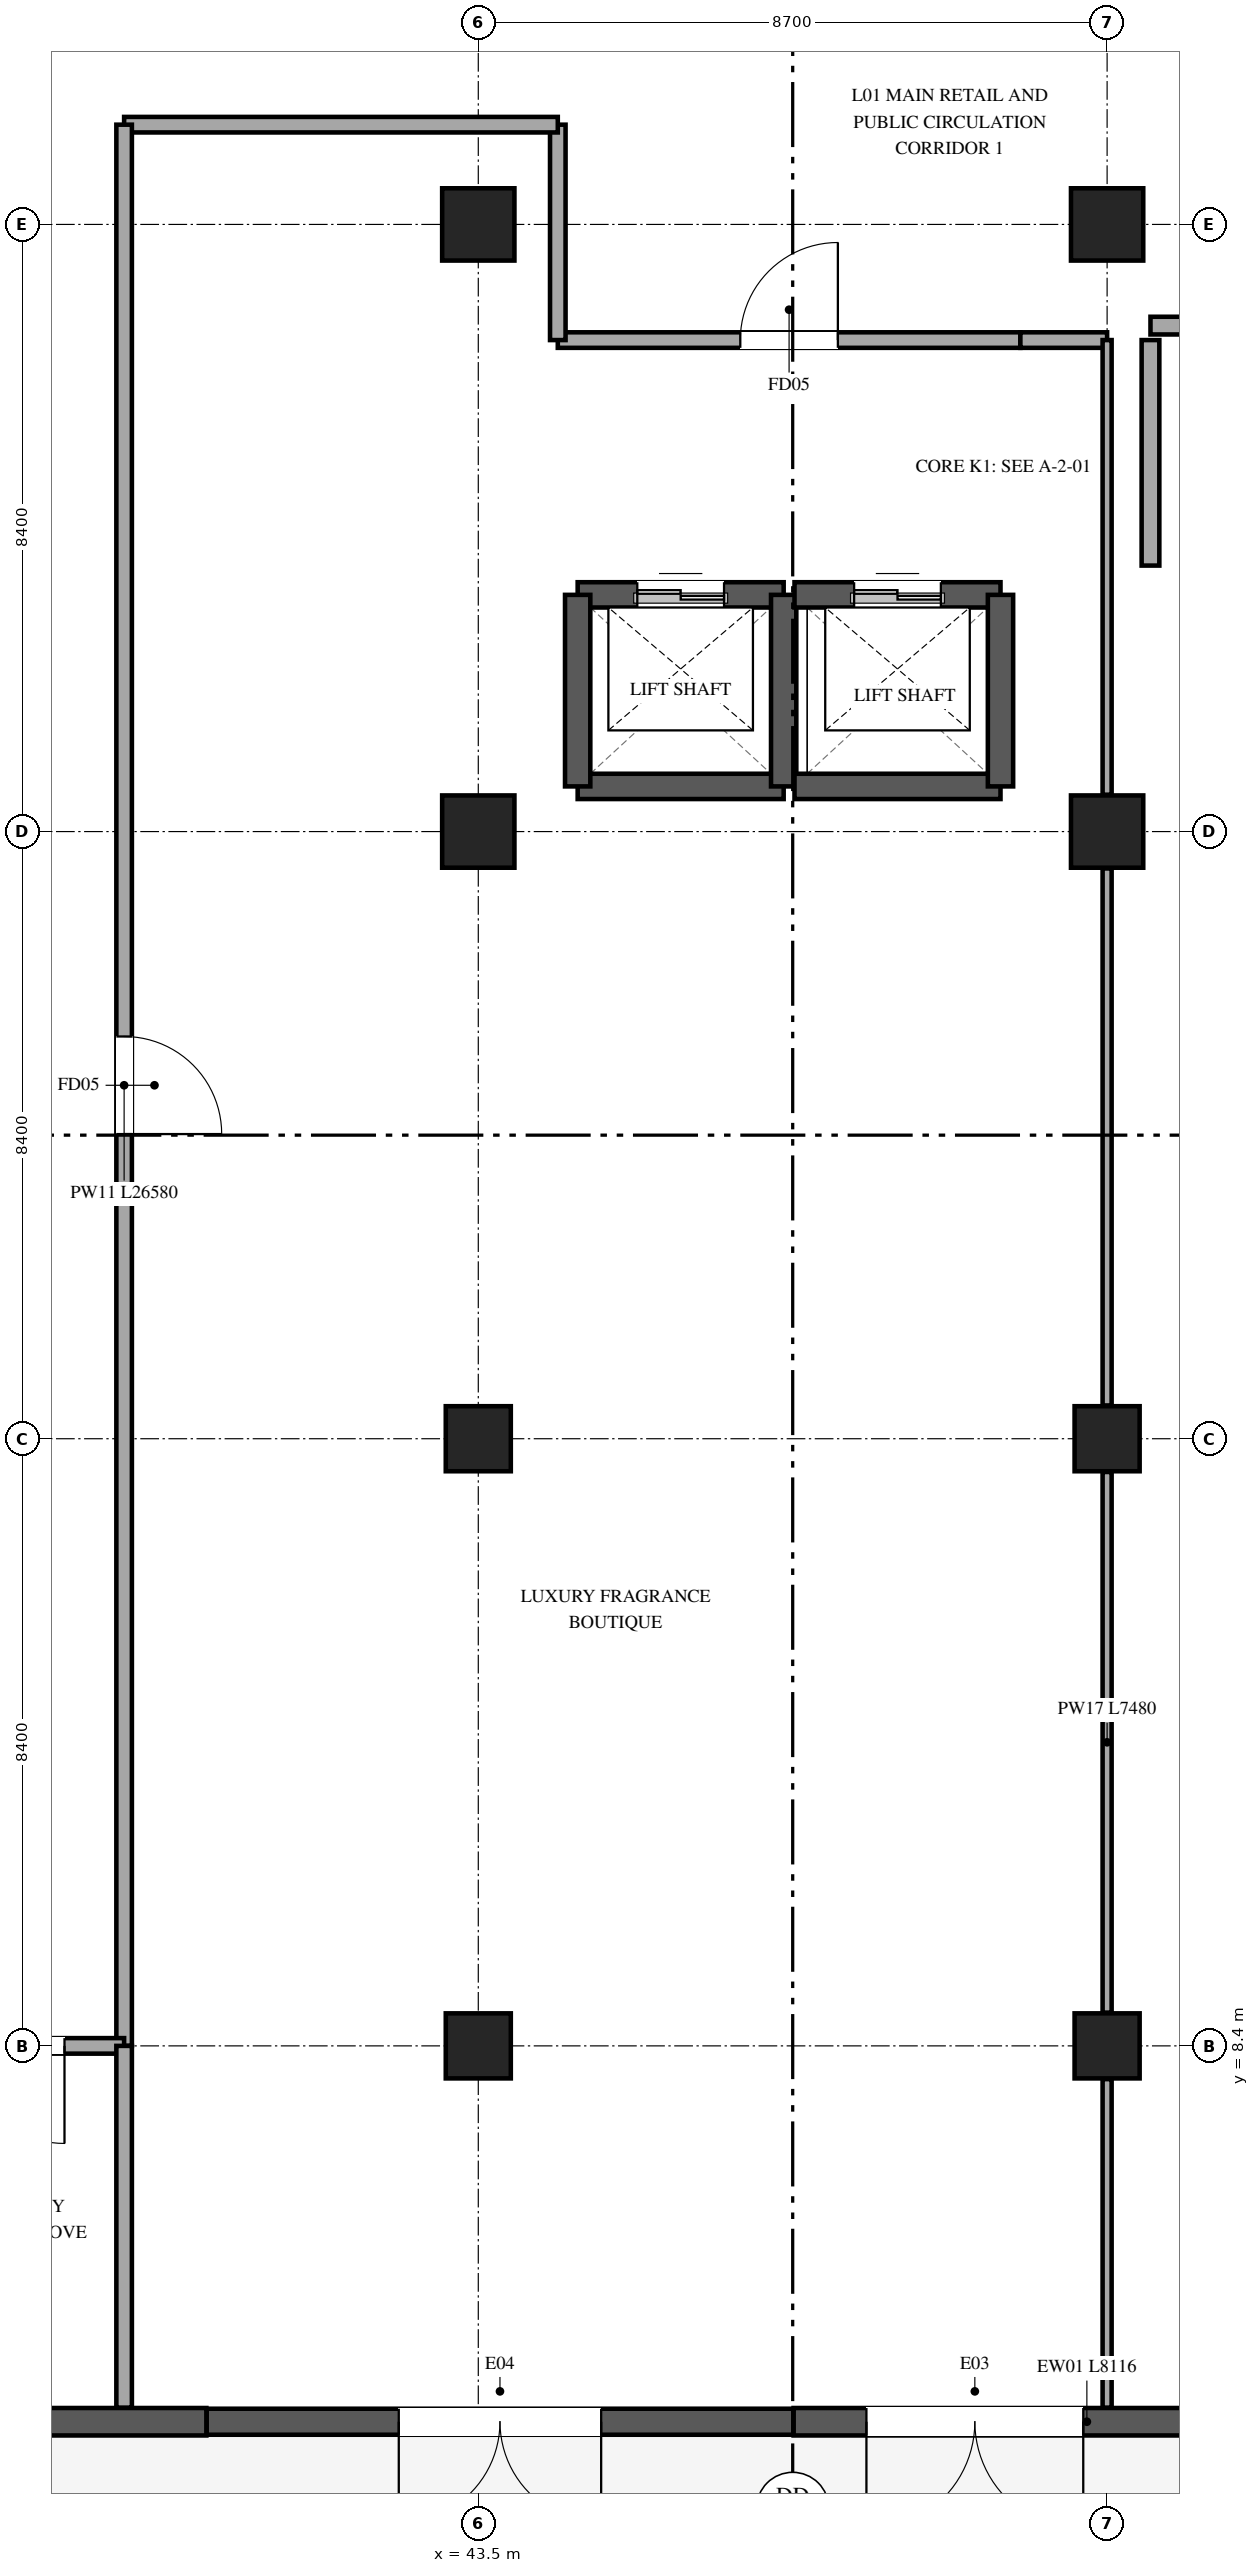
"""IFC4 building model, lengths in metres.
Left out: names, types, materials, properties, quantities, classifications, styles, units other than length and angle.
Written with IfcOpenShell. Run it as: python <this file> out.ifc"""

import sys

from ifc_helpers import new_model, si_unit, direction, frame, frame_2d, origin, origin_2d, place, context, subcontext, project, spatial, rectangle, extrude, element, fill, save


model = new_model("IFC4")
c1 = context("Model", 3, precision=1e-05, world=origin(), true_north=direction((0.0, 1.0)))
c2 = subcontext(c1, "Body", "Model", "MODEL_VIEW")
j1 = project(units=[si_unit("LENGTHUNIT", "METRE"), si_unit("PLANEANGLEUNIT", "RADIAN")], contexts=[c1])
p1 = place(None, origin())
s1 = spatial("IfcSite", under=j1, at=p1, CompositionType="ELEMENT")
p2 = place(p1, origin())
s2 = spatial("IfcBuilding", under=s1, at=p2, CompositionType="ELEMENT")
p3 = place(p2, origin())
s3 = spatial("IfcBuildingStorey", under=s2, at=p3, CompositionType="ELEMENT", Elevation=0.0)
for number, where, z_axis, x_axis in (
    (1, (43.5, 8.4, 0.0), (0.0, 0.0, 1.0), (1.0, 0.0, 0.0)),
    (2, (43.5, 16.8, 0.0), (0.0, 0.0, 1.0), (1.0, 0.0, 0.0)),
):
    element("IfcColumn", number, at=place(p3, frame(where, z_axis=z_axis, x_axis=x_axis)), inside=s3, PredefinedType="COLUMN", context=c2, shape_type="SweptSolid", body=[
        extrude(rectangle(XDim=0.9, YDim=0.9, at=origin_2d()), origin(), (0.0, 0.0, 1.0), 6.0),
    ])
for number, where, z_axis, x_axis in (
    (3, (43.5, 25.2, 0.0), (0.0, 0.0, 1.0), (1.0, 0.0, 0.0)),
    (4, (43.5, 33.6, 0.0), (0.0, 0.0, 1.0), (1.0, 0.0, 0.0)),
):
    element("IfcColumn", number, at=place(p3, frame(where, z_axis=z_axis, x_axis=x_axis)), inside=s3, PredefinedType="COLUMN", context=c2, shape_type="SweptSolid", body=[
        extrude(rectangle(XDim=1.0, YDim=1.0, at=origin_2d()), origin(), (0.0, 0.0, 1.0), 6.0),
    ])
for number, where, z_axis, x_axis in (
    (5, (52.2, 8.4, 0.0), (0.0, 0.0, 1.0), (1.0, 0.0, 0.0)),
    (6, (52.2, 16.8, 0.0), (0.0, 0.0, 1.0), (1.0, 0.0, 0.0)),
):
    element("IfcColumn", number, at=place(p3, frame(where, z_axis=z_axis, x_axis=x_axis)), inside=s3, PredefinedType="COLUMN", context=c2, shape_type="SweptSolid", body=[
        extrude(rectangle(XDim=0.9, YDim=0.9, at=origin_2d()), origin(), (0.0, 0.0, 1.0), 6.0),
    ])
for number, where, z_axis, x_axis in (
    (7, (52.2, 25.2, 0.0), (0.0, 0.0, 1.0), (1.0, 0.0, 0.0)),
    (8, (52.2, 33.6, 0.0), (0.0, 0.0, 1.0), (1.0, 0.0, 0.0)),
):
    element("IfcColumn", number, at=place(p3, frame(where, z_axis=z_axis, x_axis=x_axis)), inside=s3, PredefinedType="COLUMN", context=c2, shape_type="SweptSolid", body=[
        extrude(rectangle(XDim=1.0, YDim=1.0, at=origin_2d()), origin(), (0.0, 0.0, 1.0), 6.0),
    ])
p4 = place(p3, frame((55.978, 3.2, 0.0), z_axis=(0.0, 0.0, 1.0), x_axis=(-1.0, 0.0, 0.0)))
e9 = element("IfcWall", 9, at=p4, inside=s3, PredefinedType="STANDARD", context=c2, shape_type="SweptSolid", body=[
    extrude(rectangle(XDim=8.116, YDim=0.38, at=frame_2d((4.058, 0.0))), origin(), (0.0, 0.0, 1.0), 5.66),
])
p5 = place(p4, frame((4.108, 0.0, 0.0)))
e10 = element("IfcOpeningElement", 10, at=p5, cuts=e9, PredefinedType="OPENING", context=c2, shape_type="SweptSolid", body=[
    extrude(rectangle(XDim=3.0, YDim=2.6, at=frame_2d((1.5, 1.3))), frame((0.0, 0.2, 0.0), z_axis=(0.0, -1.0, 0.0), x_axis=(1.0, 0.0, 0.0)), (0.0, 0.0, 1.0), 0.4),
])
p6 = place(p3, frame((47.858, 3.2, 0.0), z_axis=(0.0, 0.0, 1.0), x_axis=(-1.0, 0.0, 0.0)))
e11 = element("IfcWall", 11, at=p6, inside=s3, PredefinedType="STANDARD", context=c2, shape_type="SweptSolid", body=[
    extrude(rectangle(XDim=8.116, YDim=0.36, at=frame_2d((4.058, 0.0))), origin(), (0.0, 0.0, 1.0), 5.66),
])
p7 = place(p6, frame((2.658, 0.0, 0.0)))
e12 = element("IfcOpeningElement", 12, at=p7, cuts=e11, PredefinedType="OPENING", context=c2, shape_type="SweptSolid", body=[
    extrude(rectangle(XDim=2.8, YDim=2.5, at=frame_2d((1.4, 1.25))), frame((0.0, 0.19, 0.0), z_axis=(0.0, -1.0, 0.0), x_axis=(1.0, 0.0, 0.0)), (0.0, 0.0, 1.0), 0.38),
])
p8 = place(p3, frame((39.738, 3.2, 0.0), z_axis=(0.0, 0.0, 1.0), x_axis=(-1.0, 0.0, 0.0)))
e13 = element("IfcWall", 13, at=p8, inside=s3, PredefinedType="STANDARD", context=c2, shape_type="SweptSolid", body=[
    extrude(rectangle(XDim=8.116, YDim=0.38, at=frame_2d((4.058, 0.0))), origin(), (0.0, 0.0, 1.0), 5.66),
])
p9 = place(p3, frame((44.875, 28.475, 0.0), z_axis=(0.0, 0.0, 1.0), x_axis=(1.0, 0.0, 0.0)))
e14 = element("IfcWall", 14, at=p9, inside=s3, PredefinedType="SHEAR", context=c2, shape_type="SweptSolid", body=[
    extrude(rectangle(XDim=2.85, YDim=0.35, at=frame_2d((1.425, 0.0))), origin(), (0.0, 0.0, 1.0), 6.0),
])
p10 = place(p9, frame((0.825, 0.0, 0.0)))
e15 = element("IfcOpeningElement", 15, at=p10, cuts=e14, PredefinedType="OPENING", context=c2, shape_type="SweptSolid", body=[
    extrude(rectangle(XDim=1.2, YDim=2.2, at=frame_2d((0.6, 1.1))), frame((0.0, 0.185, 0.0), z_axis=(0.0, -1.0, 0.0), x_axis=(1.0, 0.0, 0.0)), (0.0, 0.0, 1.0), 0.37),
])
p11 = place(p3, frame((47.725, 25.825, 0.0), z_axis=(0.0, 0.0, 1.0), x_axis=(-1.0, 0.0, 0.0)))
e16 = element("IfcWall", 16, at=p11, inside=s3, PredefinedType="SHEAR", context=c2, shape_type="SweptSolid", body=[
    extrude(rectangle(XDim=2.85, YDim=0.35, at=frame_2d((1.425, 0.0))), origin(), (0.0, 0.0, 1.0), 6.0),
])
for number, where, z_axis, x_axis in (
    (17, (44.875, 25.825, 0.0), (0.0, 0.0, 1.0), (0.0, 1.0, 0.0)),
    (18, (47.725, 28.475, 0.0), (0.0, 0.0, 1.0), (0.0, -1.0, 0.0)),
):
    element("IfcWall", number, at=place(p3, frame(where, z_axis=z_axis, x_axis=x_axis)), inside=s3, PredefinedType="SHEAR", context=c2, shape_type="SweptSolid", body=[
        extrude(rectangle(XDim=2.65, YDim=0.35, at=frame_2d((1.325, 0.0))), origin(), (0.0, 0.0, 1.0), 6.0),
    ])
p12 = place(p3, frame((47.875, 28.475, 0.0), z_axis=(0.0, 0.0, 1.0), x_axis=(1.0, 0.0, 0.0)))
e19 = element("IfcWall", 19, at=p12, inside=s3, PredefinedType="SHEAR", context=c2, shape_type="SweptSolid", body=[
    extrude(rectangle(XDim=2.85, YDim=0.35, at=frame_2d((1.425, 0.0))), origin(), (0.0, 0.0, 1.0), 6.0),
])
p13 = place(p12, frame((0.825, 0.0, 0.0)))
e20 = element("IfcOpeningElement", 20, at=p13, cuts=e19, PredefinedType="OPENING", context=c2, shape_type="SweptSolid", body=[
    extrude(rectangle(XDim=1.2, YDim=2.2, at=frame_2d((0.6, 1.1))), frame((0.0, 0.185, 0.0), z_axis=(0.0, -1.0, 0.0), x_axis=(1.0, 0.0, 0.0)), (0.0, 0.0, 1.0), 0.37),
])
p14 = place(p3, frame((50.725, 25.825, 0.0), z_axis=(0.0, 0.0, 1.0), x_axis=(-1.0, 0.0, 0.0)))
e21 = element("IfcWall", 21, at=p14, inside=s3, PredefinedType="SHEAR", context=c2, shape_type="SweptSolid", body=[
    extrude(rectangle(XDim=2.85, YDim=0.35, at=frame_2d((1.425, 0.0))), origin(), (0.0, 0.0, 1.0), 6.0),
])
p15 = place(p3, frame((50.725, 28.475, 0.0), z_axis=(0.0, 0.0, 1.0), x_axis=(0.0, -1.0, 0.0)))
e22 = element("IfcWall", 22, at=p15, inside=s3, PredefinedType="SHEAR", context=c2, shape_type="SweptSolid", body=[
    extrude(rectangle(XDim=2.65, YDim=0.35, at=frame_2d((1.325, 0.0))), origin(), (0.0, 0.0, 1.0), 6.0),
])
p16 = place(p3, frame((52.8, 32.2, 0.0), z_axis=(0.0, 0.0, 1.0), x_axis=(1.0, 0.0, 0.0)))
e23 = element("IfcWall", 23, at=p16, inside=s3, PredefinedType="STANDARD", context=c2, shape_type="SweptSolid", body=[
    extrude(rectangle(XDim=4.0, YDim=0.245, at=frame_2d((2.0, 0.0))), origin(), (0.0, 0.0, 1.0), 5.66),
])
p17 = place(p16, frame((1.275, 0.0, 0.0)))
e24 = element("IfcOpeningElement", 24, at=p17, cuts=e23, PredefinedType="OPENING", context=c2, shape_type="SweptSolid", body=[
    extrude(rectangle(XDim=1.45, YDim=2.2, at=frame_2d((0.725, 1.1))), frame((0.0, 0.133, 0.0), z_axis=(0.0, -1.0, 0.0), x_axis=(1.0, 0.0, 0.0)), (0.0, 0.0, 1.0), 0.265),
])
p18 = place(p3, frame((52.8, 28.88, 0.0), z_axis=(0.0, 0.0, 1.0), x_axis=(0.0, 1.0, 0.0)))
e25 = element("IfcWall", 25, at=p18, inside=s3, PredefinedType="STANDARD", context=c2, shape_type="SweptSolid", body=[
    extrude(rectangle(XDim=3.12, YDim=0.245, at=frame_2d((1.56, 0.0))), origin(), (0.0, 0.0, 1.0), 5.66),
])
p19 = place(p3, frame((44.6, 32.0, 0.0), z_axis=(0.0, 0.0, 1.0), x_axis=(1.0, 0.0, 0.0)))
e26 = element("IfcWall", 26, at=p19, inside=s3, PredefinedType="PARTITIONING", context=c2, shape_type="SweptSolid", body=[
    extrude(rectangle(XDim=6.4, YDim=0.215, at=frame_2d((3.2, 0.0))), origin(), (0.0, 0.0, 1.0), 5.66),
])
p20 = place(p19, frame((2.525, 0.0, 0.0)))
e27 = element("IfcOpeningElement", 27, at=p20, cuts=e26, PredefinedType="OPENING", context=c2, shape_type="SweptSolid", body=[
    extrude(rectangle(XDim=1.35, YDim=2.2, at=frame_2d((0.675, 1.1))), frame((0.0, 0.118, 0.0), z_axis=(0.0, -1.0, 0.0), x_axis=(1.0, 0.0, 0.0)), (0.0, 0.0, 1.0), 0.235),
])
p21 = place(p3, frame((44.6, 32.0, 0.0), z_axis=(0.0, 0.0, 1.0), x_axis=(0.0, 1.0, 0.0)))
e28 = element("IfcWall", 28, at=p21, inside=s3, PredefinedType="PARTITIONING", context=c2, shape_type="SweptSolid", body=[
    extrude(rectangle(XDim=2.98, YDim=0.215, at=frame_2d((1.49, 0.0))), origin(), (0.0, 0.0, 1.0), 4.91),
])
p22 = place(p3, frame((44.6, 34.98, 0.0), z_axis=(0.0, 0.0, 1.0), x_axis=(-1.0, 0.0, 0.0)))
e29 = element("IfcWall", 29, at=p22, inside=s3, PredefinedType="PARTITIONING", context=c2, shape_type="SweptSolid", body=[
    extrude(rectangle(XDim=6.0, YDim=0.215, at=frame_2d((3.0, 0.0))), origin(), (0.0, 0.0, 1.0), 4.91),
])
p23 = place(p3, frame((38.6, 34.98, 0.0), z_axis=(0.0, 0.0, 1.0), x_axis=(0.0, -1.0, 0.0)))
e30 = element("IfcWall", 30, at=p23, inside=s3, PredefinedType="PARTITIONING", context=c2, shape_type="SweptSolid", body=[
    extrude(rectangle(XDim=26.58, YDim=0.215, at=frame_2d((13.29, 0.0))), origin(), (0.0, 0.0, 1.0), 4.91),
])
p24 = place(p23, frame((12.615, 0.0, 0.0)))
e31 = element("IfcOpeningElement", 31, at=p24, cuts=e30, PredefinedType="OPENING", context=c2, shape_type="SweptSolid", body=[
    extrude(rectangle(XDim=1.35, YDim=2.2, at=frame_2d((0.675, 1.1))), frame((0.0, 0.118, 0.0), z_axis=(0.0, -1.0, 0.0), x_axis=(1.0, 0.0, 0.0)), (0.0, 0.0, 1.0), 0.235),
])
p25 = place(p3, frame((52.2, 32.0, 0.0), z_axis=(0.0, 0.0, 1.0), x_axis=(-1.0, 0.0, 0.0)))
e32 = element("IfcWall", 32, at=p25, inside=s3, PredefinedType="PARTITIONING", context=c2, shape_type="SweptSolid", body=[
    extrude(rectangle(XDim=1.2, YDim=0.215, at=frame_2d((0.6, 0.0))), origin(), (0.0, 0.0, 1.0), 4.91),
])
p26 = place(p3, frame((38.6, 8.4, 0.0), z_axis=(0.0, 0.0, 1.0), x_axis=(-1.0, 0.0, 0.0)))
e33 = element("IfcWall", 33, at=p26, inside=s3, PredefinedType="PARTITIONING", context=c2, shape_type="SweptSolid", body=[
    extrude(rectangle(XDim=3.0, YDim=0.215, at=frame_2d((1.5, 0.0))), origin(), (0.0, 0.0, 1.0), 4.91),
])
p27 = place(p26, frame((0.825, 0.0, 0.0)))
e34 = element("IfcOpeningElement", 34, at=p27, cuts=e33, PredefinedType="OPENING", context=c2, shape_type="SweptSolid", body=[
    extrude(rectangle(XDim=1.35, YDim=2.2, at=frame_2d((0.675, 1.1))), frame((0.0, 0.118, 0.0), z_axis=(0.0, -1.0, 0.0), x_axis=(1.0, 0.0, 0.0)), (0.0, 0.0, 1.0), 0.235),
])
p28 = place(p3, frame((52.2, 32.0, 0.0), z_axis=(0.0, 0.0, 1.0), x_axis=(0.0, -1.0, 0.0)))
e35 = element("IfcWall", 35, at=p28, inside=s3, PredefinedType="PARTITIONING", context=c2, shape_type="SweptSolid", body=[
    extrude(rectangle(XDim=6.29, YDim=0.125, at=frame_2d((3.145, 0.0))), origin(), (0.0, 0.0, 1.0), 4.91),
])
p29 = place(p3, frame((52.2, 24.69, 0.0), z_axis=(0.0, 0.0, 1.0), x_axis=(0.0, -1.0, 0.0)))
e36 = element("IfcWall", 36, at=p29, inside=s3, PredefinedType="PARTITIONING", context=c2, shape_type="SweptSolid", body=[
    extrude(rectangle(XDim=7.43, YDim=0.125, at=frame_2d((3.715, 0.0))), origin(), (0.0, 0.0, 1.0), 4.91),
])
p30 = place(p3, frame((52.2, 16.34, 0.0), z_axis=(0.0, 0.0, 1.0), x_axis=(0.0, -1.0, 0.0)))
e37 = element("IfcWall", 37, at=p30, inside=s3, PredefinedType="PARTITIONING", context=c2, shape_type="SweptSolid", body=[
    extrude(rectangle(XDim=7.48, YDim=0.125, at=frame_2d((3.74, 0.0))), origin(), (0.0, 0.0, 1.0), 4.91),
])
p31 = place(p3, frame((52.2, 7.94, 0.0), z_axis=(0.0, 0.0, 1.0), x_axis=(0.0, -1.0, 0.0)))
e38 = element("IfcWall", 38, at=p31, inside=s3, PredefinedType="PARTITIONING", context=c2, shape_type="SweptSolid", body=[
    extrude(rectangle(XDim=4.545, YDim=0.125, at=frame_2d((2.272, 0.0))), origin(), (0.0, 0.0, 1.0), 4.91),
])
p32 = place(p3, frame((38.6, 3.395, 0.0), z_axis=(0.0, 0.0, 1.0), x_axis=(0.0, 1.0, 0.0)))
e39 = element("IfcWall", 39, at=p32, inside=s3, PredefinedType="PARTITIONING", context=c2, shape_type="SweptSolid", body=[
    extrude(rectangle(XDim=5.005, YDim=0.215, at=frame_2d((2.502, 0.0))), origin(), (0.0, 0.0, 1.0), 4.91),
])
p33 = place(p5, origin())
e40 = element("IfcDoor", 40, at=p33, inside=s3, OperationType="DOUBLE_DOOR_SINGLE_SWING", PredefinedType="DOOR", context=c2, shape_type="SweptSolid", body=[
    extrude(rectangle(XDim=3.0, YDim=2.6, at=frame_2d((1.5, 1.3))), frame((0.0, 0.025, 0.0), z_axis=(0.0, -1.0, 0.0), x_axis=(1.0, 0.0, 0.0)), (0.0, 0.0, 1.0), 0.05),
])
fill(e10, e40)
p34 = place(p7, origin())
e41 = element("IfcDoor", 41, at=p34, inside=s3, OperationType="DOUBLE_DOOR_SINGLE_SWING", PredefinedType="DOOR", context=c2, shape_type="SweptSolid", body=[
    extrude(rectangle(XDim=2.8, YDim=2.5, at=frame_2d((1.4, 1.25))), frame((0.0, 0.025, 0.0), z_axis=(0.0, -1.0, 0.0), x_axis=(1.0, 0.0, 0.0)), (0.0, 0.0, 1.0), 0.05),
])
fill(e12, e41)
p35 = place(p10, origin())
e42 = element("IfcDoor", 42, at=p35, inside=s3, OperationType="DOUBLE_DOOR_SLIDING", PredefinedType="DOOR", context=c2, shape_type="SweptSolid", body=[
    extrude(rectangle(XDim=1.2, YDim=2.2, at=frame_2d((0.6, 1.1))), frame((0.0, 0.025, 0.0), z_axis=(0.0, -1.0, 0.0), x_axis=(1.0, 0.0, 0.0)), (0.0, 0.0, 1.0), 0.05),
])
fill(e15, e42)
p36 = place(p13, origin())
e43 = element("IfcDoor", 43, at=p36, inside=s3, OperationType="DOUBLE_DOOR_SLIDING", PredefinedType="DOOR", context=c2, shape_type="SweptSolid", body=[
    extrude(rectangle(XDim=1.2, YDim=2.2, at=frame_2d((0.6, 1.1))), frame((0.0, 0.025, 0.0), z_axis=(0.0, -1.0, 0.0), x_axis=(1.0, 0.0, 0.0)), (0.0, 0.0, 1.0), 0.05),
])
fill(e20, e43)
p37 = place(p20, origin())
e44 = element("IfcDoor", 44, at=p37, inside=s3, OperationType="SINGLE_SWING_RIGHT", PredefinedType="DOOR", context=c2, shape_type="SweptSolid", body=[
    extrude(rectangle(XDim=1.35, YDim=2.2, at=frame_2d((0.675, 1.1))), frame((0.0, 0.025, 0.0), z_axis=(0.0, -1.0, 0.0), x_axis=(1.0, 0.0, 0.0)), (0.0, 0.0, 1.0), 0.05),
])
fill(e27, e44)
p38 = place(p24, origin())
e45 = element("IfcDoor", 45, at=p38, inside=s3, OperationType="SINGLE_SWING_RIGHT", PredefinedType="DOOR", context=c2, shape_type="SweptSolid", body=[
    extrude(rectangle(XDim=1.35, YDim=2.2, at=frame_2d((0.675, 1.1))), frame((0.0, 0.025, 0.0), z_axis=(0.0, -1.0, 0.0), x_axis=(1.0, 0.0, 0.0)), (0.0, 0.0, 1.0), 0.05),
])
fill(e31, e45)
p39 = place(p27, origin())
e46 = element("IfcDoor", 46, at=p39, inside=s3, OperationType="SINGLE_SWING_LEFT", PredefinedType="DOOR", context=c2, shape_type="SweptSolid", body=[
    extrude(rectangle(XDim=1.35, YDim=2.2, at=frame_2d((0.675, 1.1))), frame((0.0, 0.025, 0.0), z_axis=(0.0, -1.0, 0.0), x_axis=(1.0, 0.0, 0.0)), (0.0, 0.0, 1.0), 0.05),
])
fill(e34, e46)
save(model, sys.argv[1])
